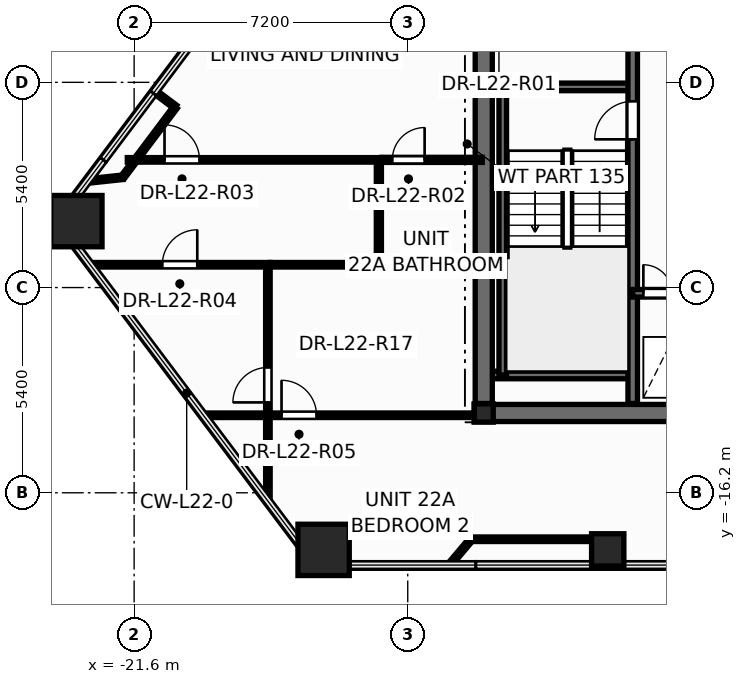
"""IFC4 building model, lengths in metres.
Left out: names, types, materials, properties, quantities, classifications, styles, units other than length and angle.
Written with IfcOpenShell. Run it as: python <this file> out.ifc"""

import sys

from ifc_helpers import new_model, si_unit, direction, frame, frame_2d, origin, origin_2d, place, context, subcontext, project, spatial, rectangle, hollow_rectangle, hollow_circle, i_section, extrude, element, fill, save


model = new_model("IFC4")
c1 = context("Model", 3, precision=1e-05, world=origin(), true_north=direction((0.0, 1.0)))
c2 = subcontext(c1, "Body", "Model", "MODEL_VIEW")
j1 = project(units=[si_unit("LENGTHUNIT", "METRE"), si_unit("PLANEANGLEUNIT", "RADIAN")], contexts=[c1])
p1 = place(None, origin())
s1 = spatial("IfcSite", under=j1, at=p1, CompositionType="ELEMENT")
p2 = place(p1, origin())
s2 = spatial("IfcBuilding", under=s1, at=p2, CompositionType="ELEMENT")
p3 = place(p2, frame((0.0, 0.0, 86.4)))
s3 = spatial("IfcBuildingStorey", under=s2, at=p3, CompositionType="ELEMENT", Elevation=86.4)
for number, where, z_axis, x_axis in (
    (1, (-23.119, -9.052, 0.0), (0.0, 0.0, 1.0), (1.0, 0.0, 0.0)),
    (2, (-16.614, -17.702, 0.0), (0.0, 0.0, 1.0), (1.0, 0.0, 0.0)),
):
    element("IfcColumn", number, at=place(p3, frame(where, z_axis=z_axis, x_axis=x_axis)), inside=s3, PredefinedType="COLUMN", context=c2, shape_type="SweptSolid", body=[
        extrude(hollow_rectangle(XDim=1.35, YDim=1.35, WallThickness=0.065, at=origin_2d()), origin(), (0.0, 0.0, 1.0), 3.6),
    ])
p4 = place(p3, frame((-9.138, -17.702, 0.0), z_axis=(0.0, 0.0, 1.0), x_axis=(1.0, 0.0, 0.0)))
e3 = element("IfcColumn", 3, at=p4, inside=s3, PredefinedType="COLUMN", context=c2, shape_type="SweptSolid", body=[
    extrude(hollow_circle(Radius=0.425, WallThickness=0.038, at=origin_2d()), origin(), (0.0, 0.0, 1.0), 3.6),
])
p5 = place(p3, frame((-12.4, -14.1, 0.0), z_axis=(0.0, 0.0, 1.0), x_axis=(1.0, 0.0, 0.0)))
e4 = element("IfcColumn", 4, at=p5, inside=s3, PredefinedType="COLUMN", context=c2, shape_type="SweptSolid", body=[
    extrude(i_section(OverallWidth=0.5, OverallDepth=0.482, WebThickness=0.04, FlangeThickness=0.045, at=origin_2d()), origin(), (0.0, 0.0, 1.0), 3.6),
])
p6 = place(p3, frame((-12.65, -14.1, 0.0), z_axis=(0.0, 0.0, 1.0), x_axis=(1.0, 0.0, 0.0)))
e5 = element("IfcWall", 5, at=p6, inside=s3, PredefinedType="SHEAR", context=c2, shape_type="SweptSolid", body=[
    extrude(rectangle(XDim=25.3, YDim=0.45, at=frame_2d((12.65, 0.0))), origin(), (0.0, 0.0, 1.0), 3.6),
])
for number, where, z_axis, x_axis in (
    (6, (-12.35, -5.52, 0.0), (0.0, 0.0, 1.0), (1.0, 0.0, 0.0)),
    (7, (-12.35, -13.1, 0.0), (0.0, 0.0, 1.0), (1.0, 0.0, 0.0)),
):
    element("IfcWall", number, at=place(p3, frame(where, z_axis=z_axis, x_axis=x_axis)), inside=s3, PredefinedType="SOLIDWALL", context=c2, shape_type="SweptSolid", body=[
        extrude(rectangle(XDim=3.87, YDim=0.2, at=frame_2d((1.935, 0.0))), origin(), (0.0, 0.0, 1.0), 3.6),
    ])
p7 = place(p3, frame((-11.9, -13.1, 0.0), z_axis=(0.0, 0.0, 1.0), x_axis=(0.0, 1.0, 0.0)))
e8 = element("IfcWall", 8, at=p7, inside=s3, PredefinedType="SOLIDWALL", context=c2, shape_type="SweptSolid", body=[
    extrude(rectangle(XDim=7.58, YDim=0.2, at=frame_2d((3.79, 0.0))), origin(), (0.0, 0.0, 1.0), 3.6),
])
p8 = place(p3, frame((-8.48, -13.85, 0.0), z_axis=(0.0, 0.0, 1.0), x_axis=(0.0, 1.0, 0.0)))
e9 = element("IfcWall", 9, at=p8, inside=s3, PredefinedType="SHEAR", context=c2, shape_type="SweptSolid", body=[
    extrude(rectangle(XDim=9.4, YDim=0.25, at=frame_2d((4.7, 0.0))), origin(), (0.0, 0.0, 1.0), 3.6),
])
p9 = place(p8, frame((6.95, 0.0, 0.0)))
e10 = element("IfcOpeningElement", 10, at=p9, cuts=e9, PredefinedType="OPENING", context=c2, shape_type="SweptSolid", body=[
    extrude(rectangle(XDim=1.006, YDim=2.104, at=frame_2d((0.5, 1.052))), frame((0.0, 0.135, 0.0), z_axis=(0.0, -1.0, 0.0), x_axis=(1.0, 0.0, 0.0)), (0.0, 0.0, 1.0), 0.27),
])
p10 = place(p3, frame((-8.48, -10.95, 0.0), z_axis=(0.0, 0.0, 1.0), x_axis=(1.0, 0.0, 0.0)))
e11 = element("IfcWall", 11, at=p10, inside=s3, PredefinedType="SOLIDWALL", context=c2, shape_type="SweptSolid", body=[
    extrude(rectangle(XDim=3.36, YDim=0.2, at=frame_2d((1.68, 0.0))), origin(), (0.0, 0.0, 1.0), 3.6),
])
p11 = place(p10, frame((0.28, 0.0, 0.0)))
e12 = element("IfcOpeningElement", 12, at=p11, cuts=e11, PredefinedType="OPENING", context=c2, shape_type="SweptSolid", body=[
    extrude(rectangle(XDim=0.756, YDim=2.054, at=frame_2d((0.375, 1.027))), frame((0.0, 0.11, 0.0), z_axis=(0.0, -1.0, 0.0), x_axis=(1.0, 0.0, 0.0)), (0.0, 0.0, 1.0), 0.22),
])
p12 = place(p10, frame((1.85, 0.0, 0.0)))
e13 = element("IfcOpeningElement", 13, at=p12, cuts=e11, PredefinedType="OPENING", context=c2, shape_type="SweptSolid", body=[
    extrude(rectangle(XDim=1.106, YDim=2.104, at=frame_2d((0.55, 1.052))), frame((0.0, 0.11, 0.0), z_axis=(0.0, -1.0, 0.0), x_axis=(1.0, 0.0, 0.0)), (0.0, 0.0, 1.0), 0.22),
])
p13 = place(p3, frame((-12.4, -13.85, 0.0), z_axis=(0.0, 0.0, 1.0), x_axis=(0.0, 1.0, 0.0)))
e14 = element("IfcWall", 14, at=p13, inside=s3, PredefinedType="SHEAR", context=c2, shape_type="SweptSolid", body=[
    extrude(rectangle(XDim=9.4, YDim=0.45, at=frame_2d((4.7, 0.0))), origin(), (0.0, 0.0, 1.0), 3.6),
])
p14 = place(p3, frame((-19.778, -14.16, 0.0), z_axis=(0.0, 0.0, 1.0), x_axis=(1.0, 0.0, 0.0)))
e15 = element("IfcWall", 15, at=p14, inside=s3, PredefinedType="PARTITIONING", context=c2, shape_type="SweptSolid", body=[
    extrude(rectangle(XDim=7.126, YDim=0.12, at=frame_2d((3.563, 0.0))), origin(), (0.0, 0.0, 1.0), 2.644),
])
p15 = place(p14, frame((2.057, 0.0, 0.0)))
e16 = element("IfcOpeningElement", 16, at=p15, cuts=e15, PredefinedType="OPENING", context=c2, shape_type="SweptSolid", body=[
    extrude(rectangle(XDim=0.926, YDim=2.104, at=frame_2d((0.46, 1.052))), frame((0.0, 0.07, 0.0), z_axis=(0.0, -1.0, 0.0), x_axis=(1.0, 0.0, 0.0)), (0.0, 0.0, 1.0), 0.14),
])
p16 = place(p3, frame((-21.78, -7.44, 0.0), z_axis=(0.0, 0.0, 1.0), x_axis=(1.0, 0.0, 0.0)))
e17 = element("IfcWall", 17, at=p16, inside=s3, PredefinedType="PARTITIONING", context=c2, shape_type="SweptSolid", body=[
    extrude(rectangle(XDim=6.7, YDim=0.12, at=frame_2d((3.35, 0.0))), origin(), (0.0, 0.0, 1.0), 2.255),
])
p17 = place(p16, frame((0.98, 0.0, 0.0)))
e18 = element("IfcOpeningElement", 18, at=p17, cuts=e17, PredefinedType="OPENING", context=c2, shape_type="SweptSolid", body=[
    extrude(rectangle(XDim=0.926, YDim=2.104, at=frame_2d((0.46, 1.052))), frame((0.0, 0.07, 0.0), z_axis=(0.0, -1.0, 0.0), x_axis=(1.0, 0.0, 0.0)), (0.0, 0.0, 1.0), 0.14),
])
p18 = place(p3, frame((-18.08, -16.418, 0.0), z_axis=(0.0, 0.0, 1.0), x_axis=(0.0, 1.0, 0.0)))
e19 = element("IfcWall", 19, at=p18, inside=s3, PredefinedType="PARTITIONING", context=c2, shape_type="SweptSolid", body=[
    extrude(rectangle(XDim=6.218, YDim=0.12, at=frame_2d((3.109, 0.0))), origin(), (0.0, 0.0, 1.0), 2.644),
])
p19 = place(p18, frame((2.596, 0.0, 0.0)))
e20 = element("IfcOpeningElement", 20, at=p19, cuts=e19, PredefinedType="OPENING", context=c2, shape_type="SweptSolid", body=[
    extrude(rectangle(XDim=0.926, YDim=2.104, at=frame_2d((0.46, 1.052))), frame((0.0, 0.07, 0.0), z_axis=(0.0, -1.0, 0.0), x_axis=(1.0, 0.0, 0.0)), (0.0, 0.0, 1.0), 0.14),
])
p20 = place(p3, frame((-22.756, -10.2, 0.0), z_axis=(0.0, 0.0, 1.0), x_axis=(1.0, 0.0, 0.0)))
e21 = element("IfcWall", 21, at=p20, inside=s3, PredefinedType="PARTITIONING", context=c2, shape_type="SweptSolid", body=[
    extrude(rectangle(XDim=4.736, YDim=0.12, at=frame_2d((2.368, 0.0))), origin(), (0.0, 0.0, 1.0), 2.644),
])
p21 = place(p20, frame((1.898, 0.0, 0.0)))
e22 = element("IfcOpeningElement", 22, at=p21, cuts=e21, PredefinedType="OPENING", context=c2, shape_type="SweptSolid", body=[
    extrude(rectangle(XDim=0.926, YDim=2.104, at=frame_2d((0.46, 1.052))), frame((0.0, 0.07, 0.0), z_axis=(0.0, -1.0, 0.0), x_axis=(1.0, 0.0, 0.0)), (0.0, 0.0, 1.0), 0.14),
])
p22 = place(p3, frame((-12.731, -17.422, 0.0), z_axis=(0.0, 0.0, 1.0), x_axis=(1.0, 0.0, 0.0)))
e23 = element("IfcWall", 23, at=p22, inside=s3, PredefinedType="PARTITIONING", context=c2, shape_type="SweptSolid", body=[
    extrude(rectangle(XDim=3.631, YDim=0.12, at=frame_2d((1.815, 0.0))), origin(), (0.0, 0.0, 1.0), 2.644),
])
p23 = place(p3, frame((-18.018, -10.2, 0.0), z_axis=(0.0, 0.0, 1.0), x_axis=(1.0, 0.0, 0.0)))
e24 = element("IfcWall", 24, at=p23, inside=s3, PredefinedType="PARTITIONING", context=c2, shape_type="SweptSolid", body=[
    extrude(rectangle(XDim=2.858, YDim=0.12, at=frame_2d((1.429, 0.0))), origin(), (0.0, 0.0, 1.0), 3.28),
])
p24 = place(p3, frame((-15.078, -7.44, 0.0), z_axis=(0.0, 0.0, 1.0), x_axis=(1.0, 0.0, 0.0)))
e25 = element("IfcWall", 25, at=p24, inside=s3, PredefinedType="PARTITIONING", context=c2, shape_type="SweptSolid", body=[
    extrude(rectangle(XDim=2.638, YDim=0.135, at=frame_2d((1.319, 0.0))), origin(), (0.0, 0.0, 1.0), 2.644),
])
p25 = place(p24, frame((0.272, 0.0, 0.0)))
e26 = element("IfcOpeningElement", 26, at=p25, cuts=e25, PredefinedType="OPENING", context=c2, shape_type="SweptSolid", body=[
    extrude(rectangle(XDim=0.856, YDim=2.104, at=frame_2d((0.425, 1.052))), frame((0.0, 0.078, 0.0), z_axis=(0.0, -1.0, 0.0), x_axis=(1.0, 0.0, 0.0)), (0.0, 0.0, 1.0), 0.155),
])
p26 = place(p3, frame((-15.16, -10.2, 0.0), z_axis=(0.0, 0.0, 1.0), x_axis=(0.0, 1.0, 0.0)))
e27 = element("IfcWall", 27, at=p26, inside=s3, PredefinedType="PARTITIONING", context=c2, shape_type="SweptSolid", body=[
    extrude(rectangle(XDim=2.76, YDim=0.135, at=frame_2d((1.38, 0.0))), origin(), (0.0, 0.0, 1.0), 3.28),
])
p27 = place(p3, frame((-15.16, -10.2, 0.0), z_axis=(0.0, 0.0, 1.0), x_axis=(1.0, 0.0, 0.0)))
e28 = element("IfcWall", 28, at=p27, inside=s3, PredefinedType="PARTITIONING", context=c2, shape_type="SweptSolid", body=[
    extrude(rectangle(XDim=2.72, YDim=0.135, at=frame_2d((1.36, 0.0))), origin(), (0.0, 0.0, 1.0), 2.644),
])
p28 = place(p3, frame((-20.512, -6.051, 0.0), z_axis=(0.0, 0.0, 1.0), x_axis=(-0.601114822283, -0.799162668317, 0.0)))
e29 = element("IfcWall", 29, at=p28, inside=s3, PredefinedType="PARTITIONING", context=c2, shape_type="SweptSolid", body=[
    extrude(rectangle(XDim=2.311, YDim=0.12, at=frame_2d((1.156, 0.0))), origin(), (0.0, 0.0, 1.0), 3.28),
])
p29 = place(p3, frame((-13.296, -18.092, 0.0), z_axis=(0.0, 0.0, 1.0), x_axis=(0.644692996289, 0.764441587393, 0.0)))
e30 = element("IfcWall", 30, at=p29, inside=s3, PredefinedType="PARTITIONING", context=c2, shape_type="SweptSolid", body=[
    extrude(rectangle(XDim=0.877, YDim=0.12, at=frame_2d((0.438, 0.0))), origin(), (0.0, 0.0, 1.0), 2.644),
])
p30 = place(p3, frame((-21.902, -7.898, 0.0), z_axis=(0.0, 0.0, 1.0), x_axis=(-0.99437860496, -0.10588290701, 0.0)))
e31 = element("IfcWall", 31, at=p30, inside=s3, PredefinedType="PARTITIONING", context=c2, shape_type="SweptSolid", body=[
    extrude(rectangle(XDim=0.849, YDim=0.12, at=frame_2d((0.424, 0.0))), origin(), (0.0, 0.0, 1.0), 2.644),
])
for number, where, z_axis, x_axis in (
    (32, (-21.048, -5.648, 0.0), (0.0, 0.0, 1.0), (0.799, -0.601, 0.0)),
    (33, (-9.1, -17.422, 0.0), (0.0, 0.0, 1.0), (0.0, -1.0, 0.0)),
):
    element("IfcWall", number, at=place(p3, frame(where, z_axis=z_axis, x_axis=x_axis)), inside=s3, PredefinedType="PARTITIONING", context=c2, shape_type="SweptSolid", body=[
        extrude(rectangle(XDim=0.67, YDim=0.12, at=frame_2d((0.335, 0.0))), origin(), (0.0, 0.0, 1.0), 2.644),
    ])
p31 = place(p9, origin())
e34 = element("IfcDoor", 34, at=p31, inside=s3, OperationType="SINGLE_SWING_LEFT", PredefinedType="DOOR", context=c2, shape_type="SweptSolid", body=[
    extrude(rectangle(XDim=1.0, YDim=2.1, at=frame_2d((0.5, 1.05))), frame((0.0, 0.025, 0.0), z_axis=(0.0, -1.0, 0.0), x_axis=(1.0, 0.0, 0.0)), (0.0, 0.0, 1.0), 0.05),
])
fill(e10, e34)
p32 = place(p11, origin())
e35 = element("IfcDoor", 35, at=p32, inside=s3, OperationType="SINGLE_SWING_LEFT", PredefinedType="DOOR", context=c2, shape_type="SweptSolid", body=[
    extrude(rectangle(XDim=0.75, YDim=2.05, at=frame_2d((0.375, 1.025))), frame((0.0, 0.025, 0.0), z_axis=(0.0, -1.0, 0.0), x_axis=(1.0, 0.0, 0.0)), (0.0, 0.0, 1.0), 0.05),
])
fill(e12, e35)
p33 = place(p25, origin())
e36 = element("IfcDoor", 36, at=p33, inside=s3, OperationType="SINGLE_SWING_RIGHT", PredefinedType="DOOR", context=c2, shape_type="SweptSolid", body=[
    extrude(rectangle(XDim=0.85, YDim=2.1, at=frame_2d((0.425, 1.05))), frame((0.0, 0.025, 0.0), z_axis=(0.0, -1.0, 0.0), x_axis=(1.0, 0.0, 0.0)), (0.0, 0.0, 1.0), 0.05),
])
fill(e26, e36)
p34 = place(p17, origin())
e37 = element("IfcDoor", 37, at=p34, inside=s3, OperationType="SINGLE_SWING_LEFT", PredefinedType="DOOR", context=c2, shape_type="SweptSolid", body=[
    extrude(rectangle(XDim=0.92, YDim=2.1, at=frame_2d((0.46, 1.05))), frame((0.0, 0.025, 0.0), z_axis=(0.0, -1.0, 0.0), x_axis=(1.0, 0.0, 0.0)), (0.0, 0.0, 1.0), 0.05),
])
fill(e18, e37)
p35 = place(p21, origin())
e38 = element("IfcDoor", 38, at=p35, inside=s3, OperationType="SINGLE_SWING_RIGHT", PredefinedType="DOOR", context=c2, shape_type="SweptSolid", body=[
    extrude(rectangle(XDim=0.92, YDim=2.1, at=frame_2d((0.46, 1.05))), frame((0.0, 0.025, 0.0), z_axis=(0.0, -1.0, 0.0), x_axis=(1.0, 0.0, 0.0)), (0.0, 0.0, 1.0), 0.05),
])
fill(e22, e38)
p36 = place(p15, origin())
e39 = element("IfcDoor", 39, at=p36, inside=s3, OperationType="SINGLE_SWING_LEFT", PredefinedType="DOOR", context=c2, shape_type="SweptSolid", body=[
    extrude(rectangle(XDim=0.92, YDim=2.1, at=frame_2d((0.46, 1.05))), frame((0.0, 0.025, 0.0), z_axis=(0.0, -1.0, 0.0), x_axis=(1.0, 0.0, 0.0)), (0.0, 0.0, 1.0), 0.05),
])
fill(e16, e39)
p37 = place(p19, origin())
e40 = element("IfcDoor", 40, at=p37, inside=s3, OperationType="SINGLE_SWING_LEFT", PredefinedType="DOOR", context=c2, shape_type="SweptSolid", body=[
    extrude(rectangle(XDim=0.92, YDim=2.1, at=frame_2d((0.46, 1.05))), frame((0.0, 0.025, 0.0), z_axis=(0.0, -1.0, 0.0), x_axis=(1.0, 0.0, 0.0)), (0.0, 0.0, 1.0), 0.05),
])
fill(e20, e40)
save(model, sys.argv[1])
